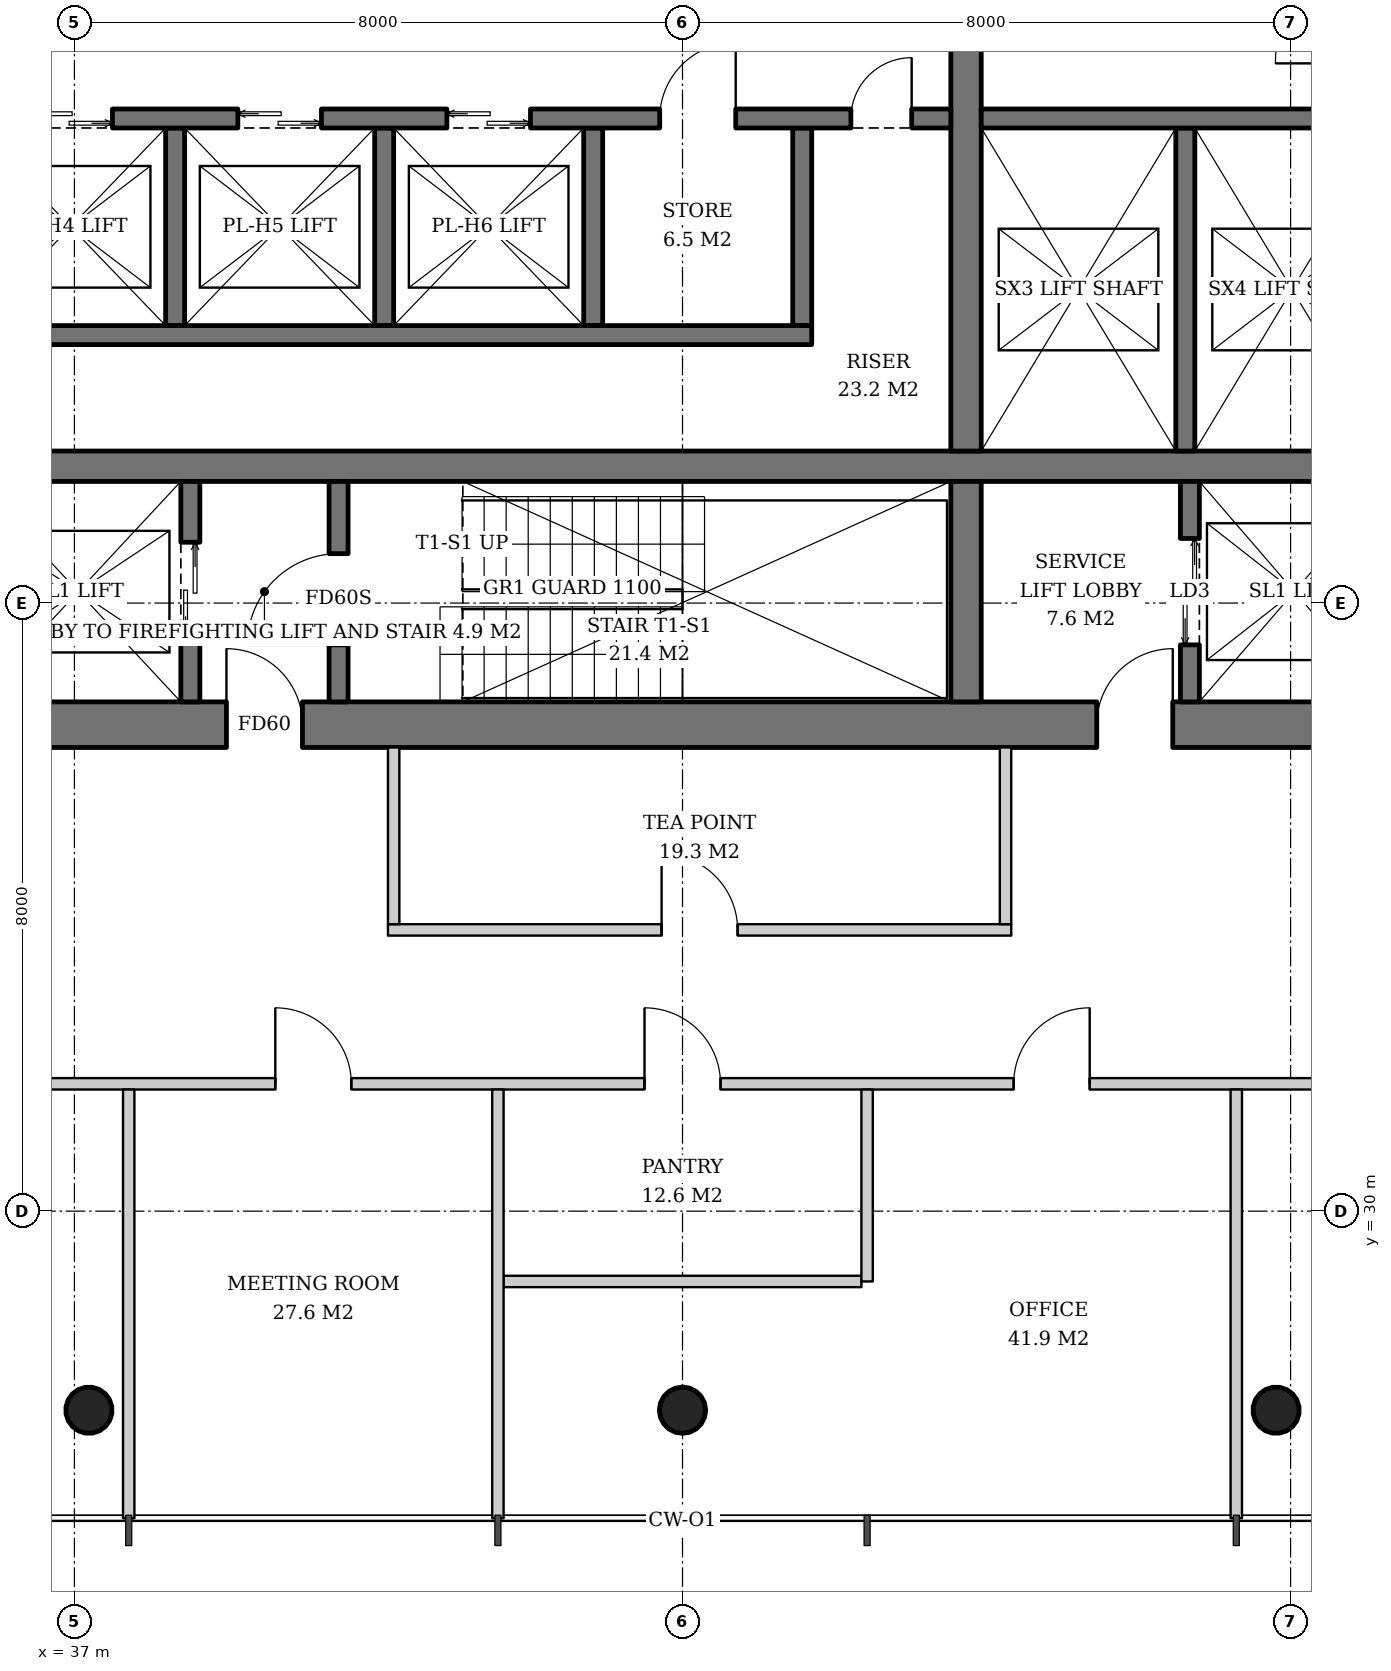
"""IFC4 building model, lengths in metres.
Left out: names, types, materials, properties, quantities, classifications, styles, units other than length and angle.
Written with IfcOpenShell. Run it as: python <this file> out.ifc"""

import sys

from ifc_helpers import new_model, si_unit, direction, frame, frame_2d, origin, origin_2d, place, context, subcontext, project, spatial, rectangle, hollow_circle, extrude, element, fill, save


model = new_model("IFC4")
c1 = context("Model", 3, precision=1e-05, world=origin(), true_north=direction((0.0, 1.0)))
c2 = subcontext(c1, "Body", "Model", "MODEL_VIEW")
j1 = project(units=[si_unit("LENGTHUNIT", "METRE"), si_unit("PLANEANGLEUNIT", "RADIAN")], contexts=[c1])
p1 = place(None, origin())
s1 = spatial("IfcSite", under=j1, at=p1, CompositionType="ELEMENT")
p2 = place(p1, origin())
s2 = spatial("IfcBuilding", under=s1, at=p2, CompositionType="ELEMENT")
p3 = place(p2, frame((0.0, 0.0, 188.2)))
s3 = spatial("IfcBuildingStorey", under=s2, at=p3, CompositionType="ELEMENT", Elevation=188.2)
p4 = place(p3, frame((37.171, 27.343, 0.0), z_axis=(0.015987204877, 0.031974409754, 0.999360818924), x_axis=(-0.894427191, 0.4472135955, 0.0)))
e1 = element("IfcColumn", 1, at=p4, inside=s3, PredefinedType="COLUMN", context=c2, shape_type="SweptSolid", body=[
    extrude(hollow_circle(Radius=0.305, WallThickness=0.025, at=origin_2d()), origin(), (0.0, 0.0, 1.0), 3.802),
])
p5 = place(p3, frame((45.0, 27.343, 0.0), z_axis=(0.0, 0.031978496719, 0.999488557087), x_axis=(-1.0, 0.0, 0.0)))
e2 = element("IfcColumn", 2, at=p5, inside=s3, PredefinedType="COLUMN", context=c2, shape_type="SweptSolid", body=[
    extrude(hollow_circle(Radius=0.305, WallThickness=0.025, at=origin_2d()), origin(), (0.0, 0.0, 1.0), 3.802),
])
p6 = place(p3, frame((52.829, 27.343, 0.0), z_axis=(-0.015987204877, 0.031974409754, 0.999360818924), x_axis=(-0.894427191, -0.4472135955, 0.0)))
e3 = element("IfcColumn", 3, at=p6, inside=s3, PredefinedType="COLUMN", context=c2, shape_type="SweptSolid", body=[
    extrude(hollow_circle(Radius=0.305, WallThickness=0.025, at=origin_2d()), origin(), (0.0, 0.0, 1.0), 3.802),
])
p7 = place(p3, frame((35.1, 36.4, 0.0), z_axis=(0.0, 0.0, 1.0), x_axis=(1.0, 0.0, 0.0)))
e4 = element("IfcWall", 4, at=p7, inside=s3, PredefinedType="SHEAR", context=c2, shape_type="SweptSolid", body=[
    extrude(rectangle(XDim=19.8, YDim=0.6, at=frame_2d((9.9, 0.0))), origin(), (0.0, 0.0, 1.0), 3.8),
])
p8 = place(p7, frame((3.9, 0.0, 0.0)))
e5 = element("IfcOpeningElement", 5, at=p8, cuts=e4, PredefinedType="OPENING", context=c2, shape_type="SweptSolid", body=[
    extrude(rectangle(XDim=1.0, YDim=2.1, at=frame_2d((0.5, 1.05))), frame((0.0, 0.31, 0.0), z_axis=(0.0, -1.0, 0.0), x_axis=(1.0, 0.0, 0.0)), (0.0, 0.0, 1.0), 0.62),
])
p9 = place(p7, frame((15.35, 0.0, 0.0)))
e6 = element("IfcOpeningElement", 6, at=p9, cuts=e4, PredefinedType="OPENING", context=c2, shape_type="SweptSolid", body=[
    extrude(rectangle(XDim=1.0, YDim=2.1, at=frame_2d((0.5, 1.05))), frame((0.0, 0.31, 0.0), z_axis=(0.0, -1.0, 0.0), x_axis=(1.0, 0.0, 0.0)), (0.0, 0.0, 1.0), 0.62),
])
p10 = place(p3, frame((35.7, 39.8, 0.0), z_axis=(0.0, 0.0, 1.0), x_axis=(1.0, 0.0, 0.0)))
e7 = element("IfcWall", 7, at=p10, inside=s3, PredefinedType="SHEAR", context=c2, shape_type="SweptSolid", body=[
    extrude(rectangle(XDim=18.6, YDim=0.4, at=frame_2d((9.3, 0.0))), origin(), (0.0, 0.0, 1.0), 3.8),
])
p11 = place(p3, frame((48.73, 36.7, 0.0), z_axis=(0.0, 0.0, 1.0), x_axis=(0.0, 1.0, 0.0)))
e8 = element("IfcWall", 8, at=p11, inside=s3, PredefinedType="SHEAR", context=c2, shape_type="SweptSolid", body=[
    extrude(rectangle(XDim=2.9, YDim=0.4, at=frame_2d((1.45, 0.0))), origin(), (0.0, 0.0, 1.0), 3.8),
])
p12 = place(p3, frame((48.73, 40.0, 0.0), z_axis=(0.0, 0.0, 1.0), x_axis=(0.0, 1.0, 0.0)))
e9 = element("IfcWall", 9, at=p12, inside=s3, PredefinedType="SHEAR", context=c2, shape_type="SweptSolid", body=[
    extrude(rectangle(XDim=12.0, YDim=0.4, at=frame_2d((6.0, 0.0))), origin(), (0.0, 0.0, 1.0), 3.8),
])
p13 = place(p3, frame((38.525, 36.7, 0.0), z_axis=(0.0, 0.0, 1.0), x_axis=(0.0, 1.0, 0.0)))
e10 = element("IfcWall", 10, at=p13, inside=s3, PredefinedType="SHEAR", context=c2, shape_type="SweptSolid", body=[
    extrude(rectangle(XDim=2.9, YDim=0.25, at=frame_2d((1.45, 0.0))), origin(), (0.0, 0.0, 1.0), 3.8),
])
p14 = place(p13, frame((0.8, 0.0, 0.0)))
e11 = element("IfcOpeningElement", 11, at=p14, cuts=e10, PredefinedType="OPENING", context=c2, shape_type="SweptSolid", body=[
    extrude(rectangle(XDim=1.3, YDim=2.2, at=frame_2d((0.65, 1.1))), frame((0.0, 0.135, 0.0), z_axis=(0.0, -1.0, 0.0), x_axis=(1.0, 0.0, 0.0)), (0.0, 0.0, 1.0), 0.27),
])
p15 = place(p3, frame((40.475, 36.7, 0.0), z_axis=(0.0, 0.0, 1.0), x_axis=(0.0, 1.0, 0.0)))
e12 = element("IfcWall", 12, at=p15, inside=s3, PredefinedType="SHEAR", context=c2, shape_type="SweptSolid", body=[
    extrude(rectangle(XDim=2.9, YDim=0.25, at=frame_2d((1.45, 0.0))), origin(), (0.0, 0.0, 1.0), 3.8),
])
p16 = place(p15, frame((0.75, 0.0, 0.0)))
e13 = element("IfcOpeningElement", 13, at=p16, cuts=e12, PredefinedType="OPENING", context=c2, shape_type="SweptSolid", body=[
    extrude(rectangle(XDim=1.2, YDim=2.1, at=frame_2d((0.6, 1.05))), frame((0.0, 0.135, 0.0), z_axis=(0.0, -1.0, 0.0), x_axis=(1.0, 0.0, 0.0)), (0.0, 0.0, 1.0), 0.27),
])
p17 = place(p3, frame((51.675, 36.7, 0.0), z_axis=(0.0, 0.0, 1.0), x_axis=(0.0, 1.0, 0.0)))
e14 = element("IfcWall", 14, at=p17, inside=s3, PredefinedType="SHEAR", context=c2, shape_type="SweptSolid", body=[
    extrude(rectangle(XDim=2.9, YDim=0.25, at=frame_2d((1.45, 0.0))), origin(), (0.0, 0.0, 1.0), 3.8),
])
p18 = place(p17, frame((0.75, 0.0, 0.0)))
e15 = element("IfcOpeningElement", 15, at=p18, cuts=e14, PredefinedType="OPENING", context=c2, shape_type="SweptSolid", body=[
    extrude(rectangle(XDim=1.4, YDim=2.4, at=frame_2d((0.7, 1.2))), frame((0.0, 0.135, 0.0), z_axis=(0.0, -1.0, 0.0), x_axis=(1.0, 0.0, 0.0)), (0.0, 0.0, 1.0), 0.27),
])
for number, where, z_axis, x_axis in (
    (16, (38.325, 44.25, 0.0), (0.0, 0.0, 1.0), (0.0, -1.0, 0.0)),
    (17, (41.075, 44.25, 0.0), (0.0, 0.0, 1.0), (0.0, -1.0, 0.0)),
    (18, (43.825, 44.25, 0.0), (0.0, 0.0, 1.0), (0.0, -1.0, 0.0)),
    (19, (46.575, 44.25, 0.0), (0.0, 0.0, 1.0), (0.0, -1.0, 0.0)),
):
    element("IfcWall", number, at=place(p3, frame(where, z_axis=z_axis, x_axis=x_axis)), inside=s3, PredefinedType="SHEAR", context=c2, shape_type="SweptSolid", body=[
        extrude(rectangle(XDim=2.6, YDim=0.25, at=frame_2d((1.3, 0.0))), origin(), (0.0, 0.0, 1.0), 3.8),
    ])
p19 = place(p3, frame((35.7, 41.525, 0.0), z_axis=(0.0, 0.0, 1.0), x_axis=(1.0, 0.0, 0.0)))
e20 = element("IfcWall", 20, at=p19, inside=s3, PredefinedType="SHEAR", context=c2, shape_type="SweptSolid", body=[
    extrude(rectangle(XDim=11.0, YDim=0.25, at=frame_2d((5.5, 0.0))), origin(), (0.0, 0.0, 1.0), 3.8),
])
p20 = place(p3, frame((35.7, 44.375, 0.0), z_axis=(0.0, 0.0, 1.0), x_axis=(1.0, 0.0, 0.0)))
e21 = element("IfcWall", 21, at=p20, inside=s3, PredefinedType="SHEAR", context=c2, shape_type="SweptSolid", body=[
    extrude(rectangle(XDim=12.83, YDim=0.25, at=frame_2d((6.415, 0.0))), origin(), (0.0, 0.0, 1.0), 3.8),
])
p21 = place(p20, frame((0.7, 0.0, 0.0)))
e22 = element("IfcOpeningElement", 22, at=p21, cuts=e21, PredefinedType="OPENING", context=c2, shape_type="SweptSolid", body=[
    extrude(rectangle(XDim=1.1, YDim=2.2, at=frame_2d((0.55, 1.1))), frame((0.0, 0.135, 0.0), z_axis=(0.0, -1.0, 0.0), x_axis=(1.0, 0.0, 0.0)), (0.0, 0.0, 1.0), 0.27),
])
p22 = place(p20, frame((3.45, 0.0, 0.0)))
e23 = element("IfcOpeningElement", 23, at=p22, cuts=e21, PredefinedType="OPENING", context=c2, shape_type="SweptSolid", body=[
    extrude(rectangle(XDim=1.1, YDim=2.2, at=frame_2d((0.55, 1.1))), frame((0.0, 0.135, 0.0), z_axis=(0.0, -1.0, 0.0), x_axis=(1.0, 0.0, 0.0)), (0.0, 0.0, 1.0), 0.27),
])
p23 = place(p20, frame((6.2, 0.0, 0.0)))
e24 = element("IfcOpeningElement", 24, at=p23, cuts=e21, PredefinedType="OPENING", context=c2, shape_type="SweptSolid", body=[
    extrude(rectangle(XDim=1.1, YDim=2.2, at=frame_2d((0.55, 1.1))), frame((0.0, 0.135, 0.0), z_axis=(0.0, -1.0, 0.0), x_axis=(1.0, 0.0, 0.0)), (0.0, 0.0, 1.0), 0.27),
])
p24 = place(p20, frame((9.0, 0.0, 0.0)))
e25 = element("IfcOpeningElement", 25, at=p24, cuts=e21, PredefinedType="OPENING", context=c2, shape_type="SweptSolid", body=[
    extrude(rectangle(XDim=1.0, YDim=2.1, at=frame_2d((0.5, 1.05))), frame((0.0, 0.135, 0.0), z_axis=(0.0, -1.0, 0.0), x_axis=(1.0, 0.0, 0.0)), (0.0, 0.0, 1.0), 0.27),
])
p25 = place(p20, frame((11.515, 0.0, 0.0)))
e26 = element("IfcOpeningElement", 26, at=p25, cuts=e21, PredefinedType="OPENING", context=c2, shape_type="SweptSolid", body=[
    extrude(rectangle(XDim=0.8, YDim=2.0, at=frame_2d((0.4, 1.0))), frame((0.0, 0.135, 0.0), z_axis=(0.0, -1.0, 0.0), x_axis=(1.0, 0.0, 0.0)), (0.0, 0.0, 1.0), 0.27),
])
p26 = place(p3, frame((51.615, 44.25, 0.0), z_axis=(0.0, 0.0, 1.0), x_axis=(0.0, -1.0, 0.0)))
e27 = element("IfcWall", 27, at=p26, inside=s3, PredefinedType="SHEAR", context=c2, shape_type="SweptSolid", body=[
    extrude(rectangle(XDim=4.25, YDim=0.25, at=frame_2d((2.125, 0.0))), origin(), (0.0, 0.0, 1.0), 3.8),
])
p27 = place(p3, frame((48.93, 44.375, 0.0), z_axis=(0.0, 0.0, 1.0), x_axis=(1.0, 0.0, 0.0)))
e28 = element("IfcWall", 28, at=p27, inside=s3, PredefinedType="SHEAR", context=c2, shape_type="SweptSolid", body=[
    extrude(rectangle(XDim=5.37, YDim=0.25, at=frame_2d((2.685, 0.0))), origin(), (0.0, 0.0, 1.0), 3.8),
])
p28 = place(p3, frame((41.125, 33.7, 0.0), z_axis=(0.0, 0.0, 1.0), x_axis=(1.0, 0.0, 0.0)))
e29 = element("IfcWall", 29, at=p28, inside=s3, PredefinedType="PARTITIONING", context=c2, shape_type="SweptSolid", body=[
    extrude(rectangle(XDim=8.2, YDim=0.15, at=frame_2d((4.1, 0.0))), origin(), (0.0, 0.0, 1.0), 2.867),
])
p29 = place(p28, frame((3.6, 0.0, 0.0)))
e30 = element("IfcOpeningElement", 30, at=p29, cuts=e29, PredefinedType="OPENING", context=c2, shape_type="SweptSolid", body=[
    extrude(rectangle(XDim=1.0, YDim=2.1, at=frame_2d((0.5, 1.05))), frame((0.0, 0.085, 0.0), z_axis=(0.0, -1.0, 0.0), x_axis=(1.0, 0.0, 0.0)), (0.0, 0.0, 1.0), 0.17),
])
for number, where, z_axis, x_axis in (
    (31, (41.2, 36.1, 0.0), (0.0, 0.0, 1.0), (0.0, -1.0, 0.0)),
    (32, (49.25, 36.1, 0.0), (0.0, 0.0, 1.0), (0.0, -1.0, 0.0)),
):
    element("IfcWall", number, at=place(p3, frame(where, z_axis=z_axis, x_axis=x_axis)), inside=s3, PredefinedType="PARTITIONING", context=c2, shape_type="SweptSolid", body=[
        extrude(rectangle(XDim=2.325, YDim=0.15, at=frame_2d((1.163, 0.0))), origin(), (0.0, 0.0, 1.0), 3.62),
    ])
p30 = place(p3, frame((42.646, 29.075, 0.0), z_axis=(0.0, 0.0, 1.0), x_axis=(1.0, 0.0, 0.0)))
e33 = element("IfcWall", 33, at=p30, inside=s3, PredefinedType="PARTITIONING", context=c2, shape_type="SweptSolid", body=[
    extrude(rectangle(XDim=4.707, YDim=0.15, at=frame_2d((2.354, 0.0))), origin(), (0.0, 0.0, 1.0), 2.867),
])
p31 = place(p3, frame((31.943, 31.675, 0.0), z_axis=(0.0, 0.0, 1.0), x_axis=(1.0, 0.0, 0.0)))
e34 = element("IfcWall", 34, at=p31, inside=s3, PredefinedType="PARTITIONING", context=c2, shape_type="SweptSolid", body=[
    extrude(rectangle(XDim=26.114, YDim=0.15, at=frame_2d((13.057, 0.0))), origin(), (0.0, 0.0, 1.0), 2.867),
])
p32 = place(p31, frame((2.843, 0.0, 0.0)))
e35 = element("IfcOpeningElement", 35, at=p32, cuts=e34, PredefinedType="OPENING", context=c2, shape_type="SweptSolid", body=[
    extrude(rectangle(XDim=1.0, YDim=2.1, at=frame_2d((0.5, 1.05))), frame((0.0, 0.085, 0.0), z_axis=(0.0, -1.0, 0.0), x_axis=(1.0, 0.0, 0.0)), (0.0, 0.0, 1.0), 0.17),
])
p33 = place(p31, frame((7.7, 0.0, 0.0)))
e36 = element("IfcOpeningElement", 36, at=p33, cuts=e34, PredefinedType="OPENING", context=c2, shape_type="SweptSolid", body=[
    extrude(rectangle(XDim=1.0, YDim=2.1, at=frame_2d((0.5, 1.05))), frame((0.0, 0.085, 0.0), z_axis=(0.0, -1.0, 0.0), x_axis=(1.0, 0.0, 0.0)), (0.0, 0.0, 1.0), 0.17),
])
p34 = place(p31, frame((12.557, 0.0, 0.0)))
e37 = element("IfcOpeningElement", 37, at=p34, cuts=e34, PredefinedType="OPENING", context=c2, shape_type="SweptSolid", body=[
    extrude(rectangle(XDim=1.0, YDim=2.1, at=frame_2d((0.5, 1.05))), frame((0.0, 0.085, 0.0), z_axis=(0.0, -1.0, 0.0), x_axis=(1.0, 0.0, 0.0)), (0.0, 0.0, 1.0), 0.17),
])
p35 = place(p31, frame((17.414, 0.0, 0.0)))
e38 = element("IfcOpeningElement", 38, at=p35, cuts=e34, PredefinedType="OPENING", context=c2, shape_type="SweptSolid", body=[
    extrude(rectangle(XDim=1.0, YDim=2.1, at=frame_2d((0.5, 1.05))), frame((0.0, 0.085, 0.0), z_axis=(0.0, -1.0, 0.0), x_axis=(1.0, 0.0, 0.0)), (0.0, 0.0, 1.0), 0.17),
])
p36 = place(p31, frame((22.271, 0.0, 0.0)))
e39 = element("IfcOpeningElement", 39, at=p36, cuts=e34, PredefinedType="OPENING", context=c2, shape_type="SweptSolid", body=[
    extrude(rectangle(XDim=1.0, YDim=2.1, at=frame_2d((0.5, 1.05))), frame((0.0, 0.085, 0.0), z_axis=(0.0, -1.0, 0.0), x_axis=(1.0, 0.0, 0.0)), (0.0, 0.0, 1.0), 0.17),
])
for number, where, z_axis, x_axis in (
    (40, (37.714, 31.6, 0.0), (0.0, 0.0, 1.0), (0.0, -1.0, 0.0)),
    (41, (42.572, 31.6, 0.0), (0.0, 0.0, 1.0), (0.0, -1.0, 0.0)),
):
    element("IfcWall", number, at=place(p3, frame(where, z_axis=z_axis, x_axis=x_axis)), inside=s3, PredefinedType="PARTITIONING", context=c2, shape_type="SweptSolid", body=[
        extrude(rectangle(XDim=5.64, YDim=0.15, at=frame_2d((2.82, 0.0))), origin(), (0.0, 0.0, 1.0), 3.12),
    ])
p37 = place(p3, frame((47.428, 31.6, 0.0), z_axis=(0.0, 0.0, 1.0), x_axis=(0.0, -1.0, 0.0)))
e42 = element("IfcWall", 42, at=p37, inside=s3, PredefinedType="PARTITIONING", context=c2, shape_type="SweptSolid", body=[
    extrude(rectangle(XDim=2.525, YDim=0.15, at=frame_2d((1.263, 0.0))), origin(), (0.0, 0.0, 1.0), 2.867),
])
p38 = place(p3, frame((52.286, 31.6, 0.0), z_axis=(0.0, 0.0, 1.0), x_axis=(0.0, -1.0, 0.0)))
e43 = element("IfcWall", 43, at=p38, inside=s3, PredefinedType="PARTITIONING", context=c2, shape_type="SweptSolid", body=[
    extrude(rectangle(XDim=5.64, YDim=0.15, at=frame_2d((2.82, 0.0))), origin(), (0.0, 0.0, 1.0), 3.12),
])
p39 = place(p14, origin())
e44 = element("IfcDoor", 44, at=p39, inside=s3, OperationType="DOUBLE_DOOR_SLIDING", PredefinedType="DOOR", context=c2, shape_type="SweptSolid", body=[
    extrude(rectangle(XDim=1.3, YDim=2.2, at=frame_2d((0.65, 1.1))), frame((0.0, 0.025, 0.0), z_axis=(0.0, -1.0, 0.0), x_axis=(1.0, 0.0, 0.0)), (0.0, 0.0, 1.0), 0.05),
])
fill(e11, e44)
p40 = place(p16, origin())
e45 = element("IfcDoor", 45, at=p40, inside=s3, OperationType="SINGLE_SWING_LEFT", PredefinedType="DOOR", context=c2, shape_type="SweptSolid", body=[
    extrude(rectangle(XDim=1.2, YDim=2.1, at=frame_2d((0.6, 1.05))), frame((0.0, 0.025, 0.0), z_axis=(0.0, -1.0, 0.0), x_axis=(1.0, 0.0, 0.0)), (0.0, 0.0, 1.0), 0.05),
])
fill(e13, e45)
p41 = place(p18, origin())
e46 = element("IfcDoor", 46, at=p41, inside=s3, OperationType="DOUBLE_DOOR_SLIDING", PredefinedType="DOOR", context=c2, shape_type="SweptSolid", body=[
    extrude(rectangle(XDim=1.4, YDim=2.4, at=frame_2d((0.7, 1.2))), frame((0.0, 0.025, 0.0), z_axis=(0.0, -1.0, 0.0), x_axis=(1.0, 0.0, 0.0)), (0.0, 0.0, 1.0), 0.05),
])
fill(e15, e46)
p42 = place(p21, origin())
e47 = element("IfcDoor", 47, at=p42, inside=s3, OperationType="DOUBLE_DOOR_SLIDING", PredefinedType="DOOR", context=c2, shape_type="SweptSolid", body=[
    extrude(rectangle(XDim=1.1, YDim=2.2, at=frame_2d((0.55, 1.1))), frame((0.0, 0.025, 0.0), z_axis=(0.0, -1.0, 0.0), x_axis=(1.0, 0.0, 0.0)), (0.0, 0.0, 1.0), 0.05),
])
fill(e22, e47)
p43 = place(p22, origin())
e48 = element("IfcDoor", 48, at=p43, inside=s3, OperationType="DOUBLE_DOOR_SLIDING", PredefinedType="DOOR", context=c2, shape_type="SweptSolid", body=[
    extrude(rectangle(XDim=1.1, YDim=2.2, at=frame_2d((0.55, 1.1))), frame((0.0, 0.025, 0.0), z_axis=(0.0, -1.0, 0.0), x_axis=(1.0, 0.0, 0.0)), (0.0, 0.0, 1.0), 0.05),
])
fill(e23, e48)
p44 = place(p23, origin())
e49 = element("IfcDoor", 49, at=p44, inside=s3, OperationType="DOUBLE_DOOR_SLIDING", PredefinedType="DOOR", context=c2, shape_type="SweptSolid", body=[
    extrude(rectangle(XDim=1.1, YDim=2.2, at=frame_2d((0.55, 1.1))), frame((0.0, 0.025, 0.0), z_axis=(0.0, -1.0, 0.0), x_axis=(1.0, 0.0, 0.0)), (0.0, 0.0, 1.0), 0.05),
])
fill(e24, e49)
p45 = place(p24, origin())
e50 = element("IfcDoor", 50, at=p45, inside=s3, OperationType="SINGLE_SWING_RIGHT", PredefinedType="DOOR", context=c2, shape_type="SweptSolid", body=[
    extrude(rectangle(XDim=1.0, YDim=2.1, at=frame_2d((0.5, 1.05))), frame((0.0, 0.025, 0.0), z_axis=(0.0, -1.0, 0.0), x_axis=(1.0, 0.0, 0.0)), (0.0, 0.0, 1.0), 0.05),
])
fill(e25, e50)
p46 = place(p25, origin())
e51 = element("IfcDoor", 51, at=p46, inside=s3, OperationType="SINGLE_SWING_RIGHT", PredefinedType="DOOR", context=c2, shape_type="SweptSolid", body=[
    extrude(rectangle(XDim=0.8, YDim=2.0, at=frame_2d((0.4, 1.0))), frame((0.0, 0.025, 0.0), z_axis=(0.0, -1.0, 0.0), x_axis=(1.0, 0.0, 0.0)), (0.0, 0.0, 1.0), 0.05),
])
fill(e26, e51)
p47 = place(p8, origin())
e52 = element("IfcDoor", 52, at=p47, inside=s3, OperationType="SINGLE_SWING_LEFT", PredefinedType="DOOR", context=c2, shape_type="SweptSolid", body=[
    extrude(rectangle(XDim=1.0, YDim=2.1, at=frame_2d((0.5, 1.05))), frame((0.0, 0.025, 0.0), z_axis=(0.0, -1.0, 0.0), x_axis=(1.0, 0.0, 0.0)), (0.0, 0.0, 1.0), 0.05),
])
fill(e5, e52)
p48 = place(p9, origin())
e53 = element("IfcDoor", 53, at=p48, inside=s3, OperationType="SINGLE_SWING_RIGHT", PredefinedType="DOOR", context=c2, shape_type="SweptSolid", body=[
    extrude(rectangle(XDim=1.0, YDim=2.1, at=frame_2d((0.5, 1.05))), frame((0.0, 0.025, 0.0), z_axis=(0.0, -1.0, 0.0), x_axis=(1.0, 0.0, 0.0)), (0.0, 0.0, 1.0), 0.05),
])
fill(e6, e53)
p49 = place(p29, origin())
e54 = element("IfcDoor", 54, at=p49, inside=s3, OperationType="SINGLE_SWING_LEFT", PredefinedType="DOOR", context=c2, shape_type="SweptSolid", body=[
    extrude(rectangle(XDim=1.0, YDim=2.1, at=frame_2d((0.5, 1.05))), frame((0.0, 0.025, 0.0), z_axis=(0.0, -1.0, 0.0), x_axis=(1.0, 0.0, 0.0)), (0.0, 0.0, 1.0), 0.05),
])
fill(e30, e54)
p50 = place(p33, origin())
e55 = element("IfcDoor", 55, at=p50, inside=s3, OperationType="SINGLE_SWING_LEFT", PredefinedType="DOOR", context=c2, shape_type="SweptSolid", body=[
    extrude(rectangle(XDim=1.0, YDim=2.1, at=frame_2d((0.5, 1.05))), frame((0.0, 0.025, 0.0), z_axis=(0.0, -1.0, 0.0), x_axis=(1.0, 0.0, 0.0)), (0.0, 0.0, 1.0), 0.05),
])
fill(e36, e55)
p51 = place(p34, origin())
e56 = element("IfcDoor", 56, at=p51, inside=s3, OperationType="SINGLE_SWING_LEFT", PredefinedType="DOOR", context=c2, shape_type="SweptSolid", body=[
    extrude(rectangle(XDim=1.0, YDim=2.1, at=frame_2d((0.5, 1.05))), frame((0.0, 0.025, 0.0), z_axis=(0.0, -1.0, 0.0), x_axis=(1.0, 0.0, 0.0)), (0.0, 0.0, 1.0), 0.05),
])
fill(e37, e56)
p52 = place(p35, origin())
e57 = element("IfcDoor", 57, at=p52, inside=s3, OperationType="SINGLE_SWING_RIGHT", PredefinedType="DOOR", context=c2, shape_type="SweptSolid", body=[
    extrude(rectangle(XDim=1.0, YDim=2.1, at=frame_2d((0.5, 1.05))), frame((0.0, 0.025, 0.0), z_axis=(0.0, -1.0, 0.0), x_axis=(1.0, 0.0, 0.0)), (0.0, 0.0, 1.0), 0.05),
])
fill(e38, e57)
save(model, sys.argv[1])
